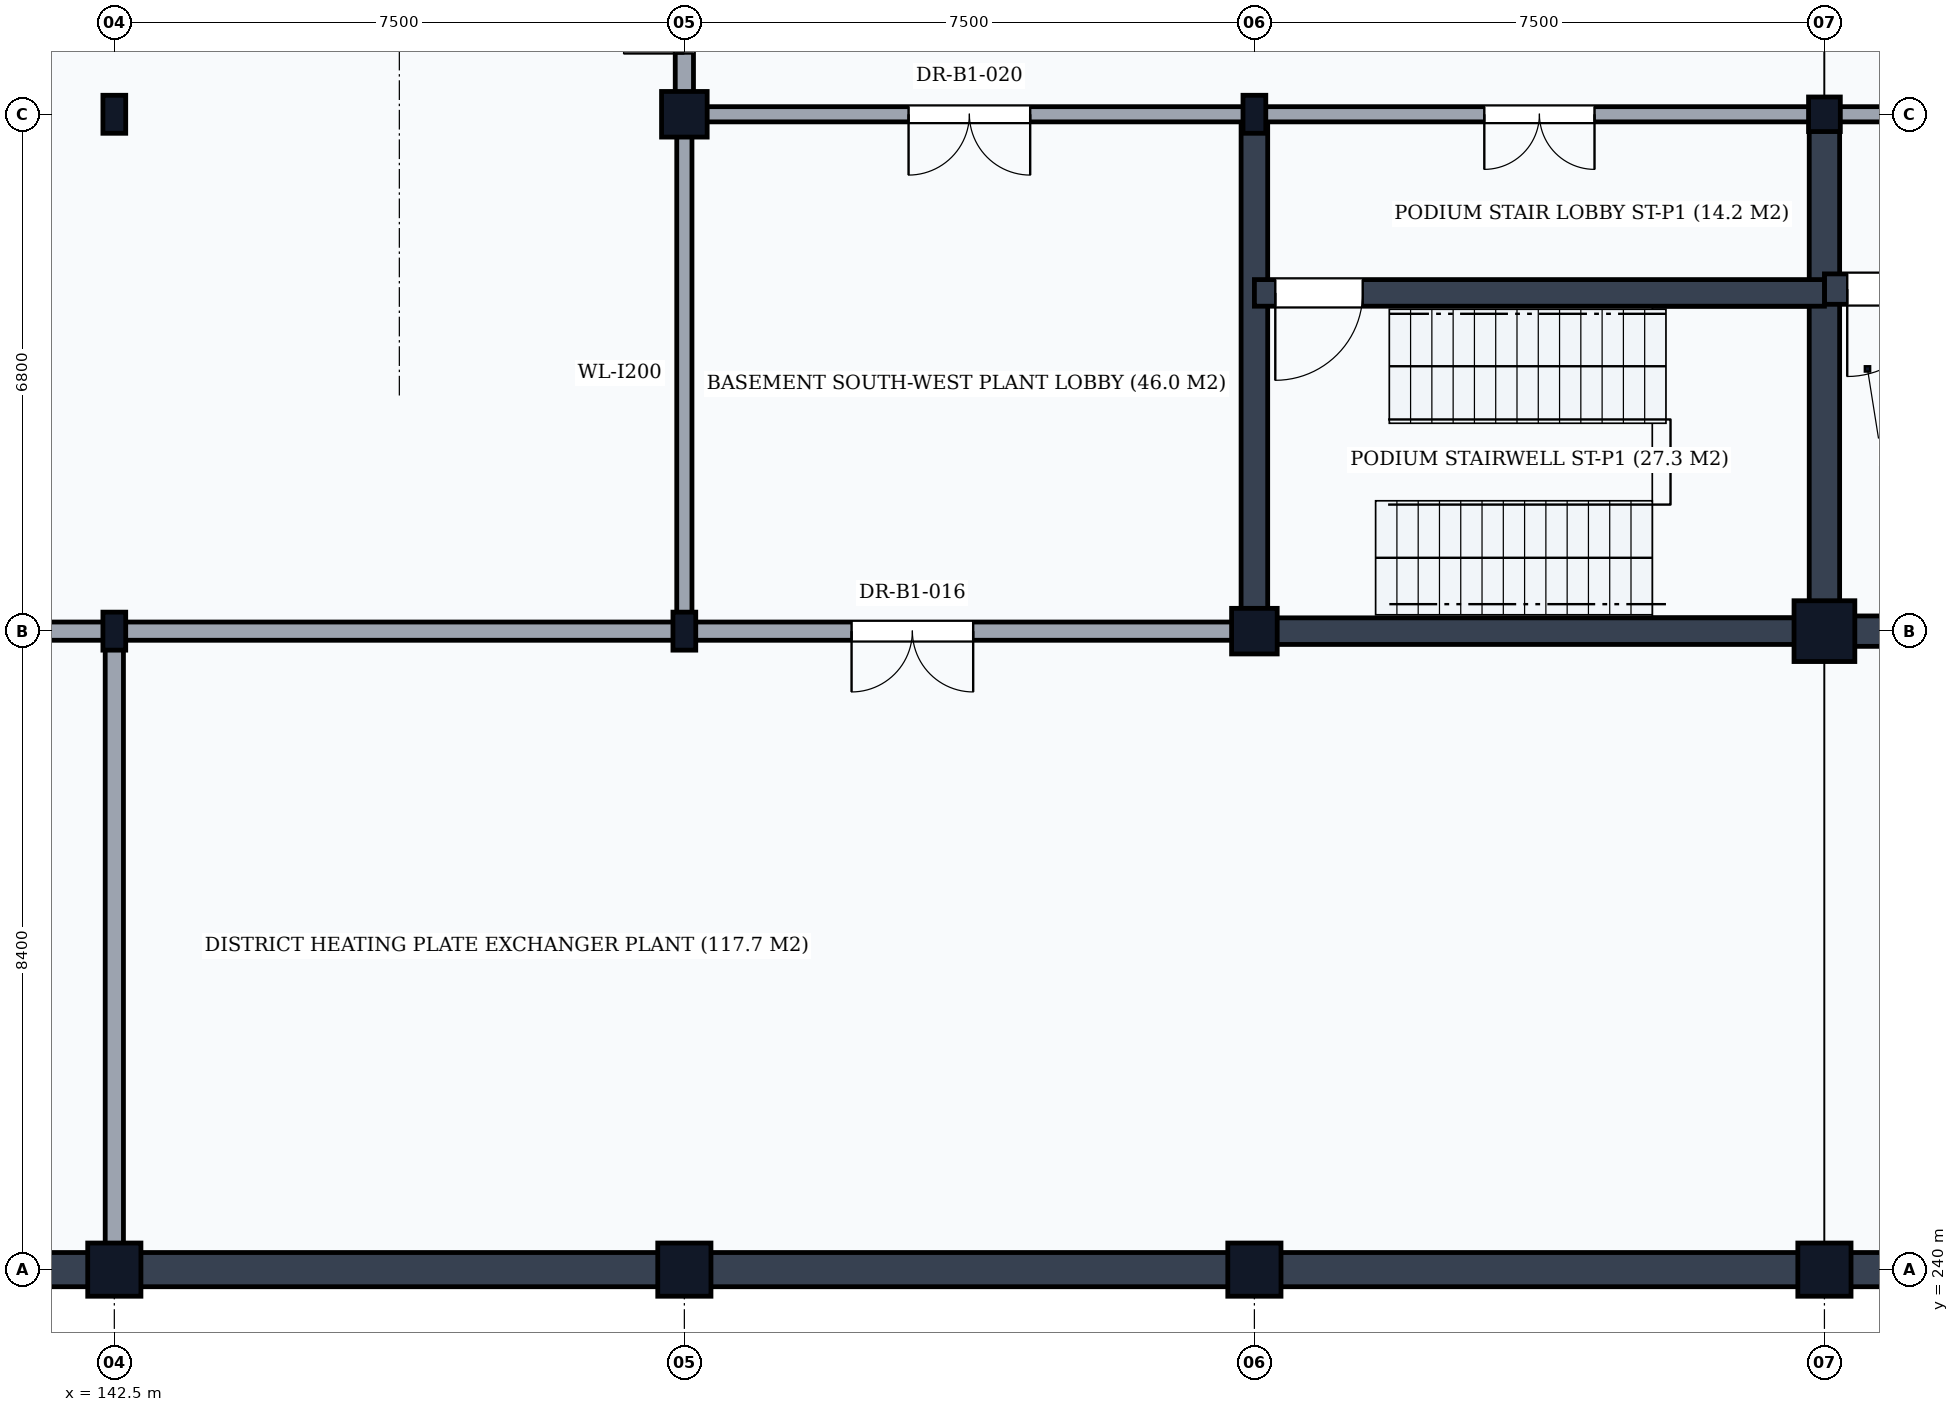
"""IFC4 building model, lengths in metres.
Left out: names, types, materials, properties, quantities, classifications, styles, units other than length and angle.
Written with IfcOpenShell. Run it as: python <this file> out.ifc"""

import sys

from ifc_helpers import new_model, si_unit, direction, frame, frame_2d, origin, origin_2d, place, context, subcontext, project, spatial, rectangle, i_section, extrude, element, fill, save


model = new_model("IFC4")
c1 = context("Model", 3, precision=1e-05, world=origin(), true_north=direction((0.0, 1.0)))
c2 = subcontext(c1, "Body", "Model", "MODEL_VIEW")
j1 = project(units=[si_unit("LENGTHUNIT", "METRE"), si_unit("PLANEANGLEUNIT", "RADIAN")], contexts=[c1])
p1 = place(None, origin())
s1 = spatial("IfcSite", under=j1, at=p1, CompositionType="ELEMENT")
p2 = place(p1, origin())
s2 = spatial("IfcBuilding", under=s1, at=p2, CompositionType="ELEMENT")
p3 = place(p2, frame((0.0, 0.0, -4.8)))
s3 = spatial("IfcBuildingStorey", under=s2, at=p3, CompositionType="ELEMENT", Elevation=-4.8)
p4 = place(p3, frame((142.5, 240.0, 0.0), z_axis=(0.0, 0.0, 1.0), x_axis=(1.0, 0.0, 0.0)))
e1 = element("IfcColumn", 1, at=p4, inside=s3, PredefinedType="COLUMN", context=c2, shape_type="SweptSolid", body=[
    extrude(rectangle(XDim=0.7, YDim=0.7, at=origin_2d()), origin(), (0.0, 0.0, 1.0), 4.8),
])
for number, where, z_axis, x_axis in (
    (2, (142.5, 248.4, 0.0), (0.0, 0.0, 1.0), (1.0, 0.0, 0.0)),
    (3, (142.5, 255.2, 0.0), (0.0, 0.0, 1.0), (1.0, 0.0, 0.0)),
):
    element("IfcColumn", number, at=place(p3, frame(where, z_axis=z_axis, x_axis=x_axis)), inside=s3, PredefinedType="COLUMN", context=c2, shape_type="SweptSolid", body=[
        extrude(i_section(OverallWidth=0.3, OverallDepth=0.5, WebThickness=0.014, FlangeThickness=0.028, FilletRadius=0.027, at=origin_2d()), origin(), (0.0, 0.0, 1.0), 4.8),
    ])
p5 = place(p3, frame((150.0, 240.0, 0.0), z_axis=(0.0, 0.0, 1.0), x_axis=(1.0, 0.0, 0.0)))
e4 = element("IfcColumn", 4, at=p5, inside=s3, PredefinedType="COLUMN", context=c2, shape_type="SweptSolid", body=[
    extrude(rectangle(XDim=0.7, YDim=0.7, at=origin_2d()), origin(), (0.0, 0.0, 1.0), 4.8),
])
p6 = place(p3, frame((150.0, 248.4, 0.0), z_axis=(0.0, 0.0, 1.0), x_axis=(1.0, 0.0, 0.0)))
e5 = element("IfcColumn", 5, at=p6, inside=s3, PredefinedType="COLUMN", context=c2, shape_type="SweptSolid", body=[
    extrude(i_section(OverallWidth=0.3, OverallDepth=0.5, WebThickness=0.014, FlangeThickness=0.028, FilletRadius=0.027, at=origin_2d()), origin(), (0.0, 0.0, 1.0), 4.8),
])
p7 = place(p3, frame((150.0, 255.2, 0.0), z_axis=(0.0, 0.0, 1.0), x_axis=(1.0, 0.0, 0.0)))
e6 = element("IfcColumn", 6, at=p7, inside=s3, PredefinedType="COLUMN", context=c2, shape_type="SweptSolid", body=[
    extrude(rectangle(XDim=0.6, YDim=0.6, at=origin_2d()), origin(), (0.0, 0.0, 1.0), 4.8),
])
p8 = place(p3, frame((157.5, 240.0, 0.0), z_axis=(0.0, 0.0, 1.0), x_axis=(1.0, 0.0, 0.0)))
e7 = element("IfcColumn", 7, at=p8, inside=s3, PredefinedType="COLUMN", context=c2, shape_type="SweptSolid", body=[
    extrude(rectangle(XDim=0.7, YDim=0.7, at=origin_2d()), origin(), (0.0, 0.0, 1.0), 4.8),
])
p9 = place(p3, frame((157.5, 248.4, 0.0), z_axis=(0.0, 0.0, 1.0), x_axis=(1.0, 0.0, 0.0)))
e8 = element("IfcColumn", 8, at=p9, inside=s3, PredefinedType="COLUMN", context=c2, shape_type="SweptSolid", body=[
    extrude(rectangle(XDim=0.6, YDim=0.6, at=origin_2d()), origin(), (0.0, 0.0, 1.0), 4.8),
])
p10 = place(p3, frame((157.5, 255.2, 0.0), z_axis=(0.0, 0.0, 1.0), x_axis=(1.0, 0.0, 0.0)))
e9 = element("IfcColumn", 9, at=p10, inside=s3, PredefinedType="COLUMN", context=c2, shape_type="SweptSolid", body=[
    extrude(i_section(OverallWidth=0.3, OverallDepth=0.5, WebThickness=0.014, FlangeThickness=0.028, FilletRadius=0.027, at=origin_2d()), origin(), (0.0, 0.0, 1.0), 4.8),
])
p11 = place(p3, frame((165.0, 240.0, 0.0), z_axis=(0.0, 0.0, 1.0), x_axis=(1.0, 0.0, 0.0)))
e10 = element("IfcColumn", 10, at=p11, inside=s3, PredefinedType="COLUMN", context=c2, shape_type="SweptSolid", body=[
    extrude(rectangle(XDim=0.7, YDim=0.7, at=origin_2d()), origin(), (0.0, 0.0, 1.0), 4.8),
])
p12 = place(p3, frame((165.0, 248.4, 0.0), z_axis=(0.0, 0.0, 1.0), x_axis=(1.0, 0.0, 0.0)))
e11 = element("IfcColumn", 11, at=p12, inside=s3, PredefinedType="COLUMN", context=c2, shape_type="SweptSolid", body=[
    extrude(rectangle(XDim=0.8, YDim=0.8, at=origin_2d()), origin(), (0.0, 0.0, 1.0), 4.8),
])
p13 = place(p3, frame((165.0, 255.2, 0.0), z_axis=(0.0, 0.0, 1.0), x_axis=(1.0, 0.0, 0.0)))
e12 = element("IfcColumn", 12, at=p13, inside=s3, PredefinedType="COLUMN", context=c2, shape_type="SweptSolid", body=[
    extrude(i_section(OverallWidth=0.418, OverallDepth=0.455, WebThickness=0.042, FlangeThickness=0.068, FilletRadius=0.015, at=origin_2d()), origin(), (0.0, 0.0, 1.0), 4.8),
])
for number, where, z_axis, x_axis in (
    (13, (135.0, 240.0, 0.0), (0.0, 0.0, 1.0), (1.0, 0.0, 0.0)),
    (14, (142.5, 240.0, 0.0), (0.0, 0.0, 1.0), (1.0, 0.0, 0.0)),
    (15, (150.0, 240.0, 0.0), (0.0, 0.0, 1.0), (1.0, 0.0, 0.0)),
    (16, (157.5, 240.0, 0.0), (0.0, 0.0, 1.0), (1.0, 0.0, 0.0)),
):
    element("IfcWall", number, at=place(p3, frame(where, z_axis=z_axis, x_axis=x_axis)), inside=s3, PredefinedType="SHEAR", context=c2, shape_type="SweptSolid", body=[
        extrude(rectangle(XDim=7.5, YDim=0.45, at=frame_2d((3.75, 0.0))), origin(), (0.0, 0.0, 1.0), 4.51),
    ])
p14 = place(p3, frame((165.0, 240.0, 0.0), z_axis=(0.0, 0.0, 1.0), x_axis=(1.0, 0.0, 0.0)))
e17 = element("IfcWall", 17, at=p14, inside=s3, PredefinedType="SHEAR", context=c2, shape_type="SweptSolid", body=[
    extrude(rectangle(XDim=8.0, YDim=0.45, at=frame_2d((4.0, 0.0))), origin(), (0.0, 0.0, 1.0), 4.51),
])
p15 = place(p3, frame((165.0, 248.4, 0.0), z_axis=(0.0, 0.0, 1.0), x_axis=(1.0, 0.0, 0.0)))
e18 = element("IfcWall", 18, at=p15, inside=s3, PredefinedType="SHEAR", context=c2, shape_type="SweptSolid", body=[
    extrude(rectangle(XDim=8.0, YDim=0.4, at=frame_2d((4.0, 0.0))), origin(), (0.0, 0.0, 1.0), 4.51),
])
p16 = place(p3, frame((165.0, 248.4, 0.0), z_axis=(0.0, 0.0, 1.0), x_axis=(0.0, 1.0, 0.0)))
e19 = element("IfcWall", 19, at=p16, inside=s3, PredefinedType="SHEAR", context=c2, shape_type="SweptSolid", body=[
    extrude(rectangle(XDim=6.8, YDim=0.4, at=frame_2d((3.4, 0.0))), origin(), (0.0, 0.0, 1.0), 4.51),
])
p17 = place(p3, frame((165.0, 252.9, 0.0), z_axis=(0.0, 0.0, 1.0), x_axis=(1.0, 0.0, 0.0)))
e20 = element("IfcWall", 20, at=p17, inside=s3, PredefinedType="SHEAR", context=c2, shape_type="SweptSolid", body=[
    extrude(rectangle(XDim=8.0, YDim=0.4, at=frame_2d((4.0, 0.0))), origin(), (0.0, 0.0, 1.0), 4.51),
])
p18 = place(p17, frame((0.3, 0.0, 0.0)))
e21 = element("IfcOpeningElement", 21, at=p18, cuts=e20, PredefinedType="OPENING", context=c2, shape_type="SweptSolid", body=[
    extrude(rectangle(XDim=1.15, YDim=2.15, at=frame_2d((0.575, 1.075))), frame((0.0, 0.215, 0.0), z_axis=(0.0, -1.0, 0.0), x_axis=(1.0, 0.0, 0.0)), (0.0, 0.0, 1.0), 0.43),
])
p19 = place(p3, frame((165.0, 255.2, 0.0), z_axis=(0.0, 0.0, 1.0), x_axis=(1.0, 0.0, 0.0)))
e22 = element("IfcWall", 22, at=p19, inside=s3, PredefinedType="PARTITIONING", context=c2, shape_type="SweptSolid", body=[
    extrude(rectangle(XDim=8.0, YDim=0.2, at=frame_2d((4.0, 0.0))), origin(), (0.0, 0.0, 1.0), 3.858),
])
p20 = place(p19, frame((3.275, 0.0, 0.0)))
e23 = element("IfcOpeningElement", 23, at=p20, cuts=e22, PredefinedType="OPENING", context=c2, shape_type="SweptSolid", body=[
    extrude(rectangle(XDim=1.45, YDim=2.2, at=frame_2d((0.725, 1.1))), frame((0.0, 0.115, 0.0), z_axis=(0.0, -1.0, 0.0), x_axis=(1.0, 0.0, 0.0)), (0.0, 0.0, 1.0), 0.23),
])
p21 = place(p3, frame((157.5, 248.4, 0.0), z_axis=(0.0, 0.0, 1.0), x_axis=(1.0, 0.0, 0.0)))
e24 = element("IfcWall", 24, at=p21, inside=s3, PredefinedType="SHEAR", context=c2, shape_type="SweptSolid", body=[
    extrude(rectangle(XDim=7.5, YDim=0.35, at=frame_2d((3.75, 0.0))), origin(), (0.0, 0.0, 1.0), 4.51),
])
p22 = place(p3, frame((157.5, 248.4, 0.0), z_axis=(0.0, 0.0, 1.0), x_axis=(0.0, 1.0, 0.0)))
e25 = element("IfcWall", 25, at=p22, inside=s3, PredefinedType="SHEAR", context=c2, shape_type="SweptSolid", body=[
    extrude(rectangle(XDim=6.8, YDim=0.35, at=frame_2d((3.4, 0.0))), origin(), (0.0, 0.0, 1.0), 4.51),
])
p23 = place(p3, frame((157.5, 252.85, 0.0), z_axis=(0.0, 0.0, 1.0), x_axis=(1.0, 0.0, 0.0)))
e26 = element("IfcWall", 26, at=p23, inside=s3, PredefinedType="SHEAR", context=c2, shape_type="SweptSolid", body=[
    extrude(rectangle(XDim=7.5, YDim=0.35, at=frame_2d((3.75, 0.0))), origin(), (0.0, 0.0, 1.0), 4.51),
])
p24 = place(p23, frame((0.275, 0.0, 0.0)))
e27 = element("IfcOpeningElement", 27, at=p24, cuts=e26, PredefinedType="OPENING", context=c2, shape_type="SweptSolid", body=[
    extrude(rectangle(XDim=1.15, YDim=2.15, at=frame_2d((0.575, 1.075))), frame((0.0, 0.19, 0.0), z_axis=(0.0, -1.0, 0.0), x_axis=(1.0, 0.0, 0.0)), (0.0, 0.0, 1.0), 0.38),
])
p25 = place(p3, frame((157.5, 255.2, 0.0), z_axis=(0.0, 0.0, 1.0), x_axis=(1.0, 0.0, 0.0)))
e28 = element("IfcWall", 28, at=p25, inside=s3, PredefinedType="PARTITIONING", context=c2, shape_type="SweptSolid", body=[
    extrude(rectangle(XDim=7.5, YDim=0.2, at=frame_2d((3.75, 0.0))), origin(), (0.0, 0.0, 1.0), 3.908),
])
p26 = place(p25, frame((3.025, 0.0, 0.0)))
e29 = element("IfcOpeningElement", 29, at=p26, cuts=e28, PredefinedType="OPENING", context=c2, shape_type="SweptSolid", body=[
    extrude(rectangle(XDim=1.45, YDim=2.2, at=frame_2d((0.725, 1.1))), frame((0.0, 0.115, 0.0), z_axis=(0.0, -1.0, 0.0), x_axis=(1.0, 0.0, 0.0)), (0.0, 0.0, 1.0), 0.23),
])
p27 = place(p3, frame((150.0, 248.4, 0.0), z_axis=(0.0, 0.0, 1.0), x_axis=(0.0, 1.0, 0.0)))
e30 = element("IfcWall", 30, at=p27, inside=s3, PredefinedType="PARTITIONING", context=c2, shape_type="SweptSolid", body=[
    extrude(rectangle(XDim=6.8, YDim=0.2, at=frame_2d((3.4, 0.0))), origin(), (0.0, 0.0, 1.0), 3.808),
])
p28 = place(p3, frame((120.0, 248.4, 0.0), z_axis=(0.0, 0.0, 1.0), x_axis=(1.0, 0.0, 0.0)))
e31 = element("IfcWall", 31, at=p28, inside=s3, PredefinedType="PARTITIONING", context=c2, shape_type="SweptSolid", body=[
    extrude(rectangle(XDim=37.5, YDim=0.24, at=frame_2d((18.75, 0.0))), origin(), (0.0, 0.0, 1.0), 3.908),
])
p29 = place(p28, frame((17.2, 0.0, 0.0)))
e32 = element("IfcOpeningElement", 32, at=p29, cuts=e31, PredefinedType="OPENING", context=c2, shape_type="SweptSolid", body=[
    extrude(rectangle(XDim=1.6, YDim=2.1, at=frame_2d((0.8, 1.05))), frame((0.0, 0.135, 0.0), z_axis=(0.0, -1.0, 0.0), x_axis=(1.0, 0.0, 0.0)), (0.0, 0.0, 1.0), 0.27),
])
p30 = place(p28, frame((32.2, 0.0, 0.0)))
e33 = element("IfcOpeningElement", 33, at=p30, cuts=e31, PredefinedType="OPENING", context=c2, shape_type="SweptSolid", body=[
    extrude(rectangle(XDim=1.6, YDim=2.1, at=frame_2d((0.8, 1.05))), frame((0.0, 0.135, 0.0), z_axis=(0.0, -1.0, 0.0), x_axis=(1.0, 0.0, 0.0)), (0.0, 0.0, 1.0), 0.27),
])
p31 = place(p3, frame((142.5, 240.0, 0.0), z_axis=(0.0, 0.0, 1.0), x_axis=(0.0, 1.0, 0.0)))
e34 = element("IfcWall", 34, at=p31, inside=s3, PredefinedType="PARTITIONING", context=c2, shape_type="SweptSolid", body=[
    extrude(rectangle(XDim=8.4, YDim=0.24, at=frame_2d((4.2, 0.0))), origin(), (0.0, 0.0, 1.0), 3.858),
])
p32 = place(p3, frame((150.0, 255.2, 0.0), z_axis=(0.0, 0.0, 1.0), x_axis=(1.0, 0.0, 0.0)))
e35 = element("IfcWall", 35, at=p32, inside=s3, PredefinedType="PARTITIONING", context=c2, shape_type="SweptSolid", body=[
    extrude(rectangle(XDim=7.5, YDim=0.2, at=frame_2d((3.75, 0.0))), origin(), (0.0, 0.0, 1.0), 3.908),
])
p33 = place(p32, frame((2.95, 0.0, 0.0)))
e36 = element("IfcOpeningElement", 36, at=p33, cuts=e35, PredefinedType="OPENING", context=c2, shape_type="SweptSolid", body=[
    extrude(rectangle(XDim=1.6, YDim=2.1, at=frame_2d((0.8, 1.05))), frame((0.0, 0.115, 0.0), z_axis=(0.0, -1.0, 0.0), x_axis=(1.0, 0.0, 0.0)), (0.0, 0.0, 1.0), 0.23),
])
p34 = place(p3, frame((150.0, 255.2, 0.0), z_axis=(0.0, 0.0, 1.0), x_axis=(0.0, 1.0, 0.0)))
e37 = element("IfcWall", 37, at=p34, inside=s3, PredefinedType="PARTITIONING", context=c2, shape_type="SweptSolid", body=[
    extrude(rectangle(XDim=98.8, YDim=0.24, at=frame_2d((49.4, 0.0))), origin(), (0.0, 0.0, 1.0), 3.808),
])
p35 = place(p34, frame((0.8, 0.0, 0.0)))
e38 = element("IfcOpeningElement", 38, at=p35, cuts=e37, PredefinedType="OPENING", context=c2, shape_type="SweptSolid", body=[
    extrude(rectangle(XDim=1.6, YDim=2.1, at=frame_2d((0.8, 1.05))), frame((0.0, 0.135, 0.0), z_axis=(0.0, -1.0, 0.0), x_axis=(1.0, 0.0, 0.0)), (0.0, 0.0, 1.0), 0.27),
])
p36 = place(p34, frame((47.4, 0.0, 0.0)))
e39 = element("IfcOpeningElement", 39, at=p36, cuts=e37, PredefinedType="OPENING", context=c2, shape_type="SweptSolid", body=[
    extrude(rectangle(XDim=1.6, YDim=2.1, at=frame_2d((0.8, 1.05))), frame((0.0, 0.135, 0.0), z_axis=(0.0, -1.0, 0.0), x_axis=(1.0, 0.0, 0.0)), (0.0, 0.0, 1.0), 0.27),
])
p37 = place(p18, frame((1.15, 0.0, 0.0), z_axis=(0.0, 0.0, 1.0), x_axis=(-1.0, 0.0, 0.0)))
e40 = element("IfcDoor", 40, at=p37, inside=s3, OperationType="SINGLE_SWING_RIGHT", PredefinedType="DOOR", context=c2, shape_type="SweptSolid", body=[
    extrude(rectangle(XDim=1.15, YDim=2.15, at=frame_2d((0.575, 1.075))), frame((0.0, 0.025, 0.0), z_axis=(0.0, -1.0, 0.0), x_axis=(1.0, 0.0, 0.0)), (0.0, 0.0, 1.0), 0.05),
])
fill(e21, e40)
p38 = place(p24, frame((1.15, 0.0, 0.0), z_axis=(0.0, 0.0, 1.0), x_axis=(-1.0, 0.0, 0.0)))
e41 = element("IfcDoor", 41, at=p38, inside=s3, OperationType="SINGLE_SWING_RIGHT", PredefinedType="DOOR", context=c2, shape_type="SweptSolid", body=[
    extrude(rectangle(XDim=1.15, YDim=2.15, at=frame_2d((0.575, 1.075))), frame((0.0, 0.025, 0.0), z_axis=(0.0, -1.0, 0.0), x_axis=(1.0, 0.0, 0.0)), (0.0, 0.0, 1.0), 0.05),
])
fill(e27, e41)
p39 = place(p26, frame((1.45, 0.0, 0.0), z_axis=(0.0, 0.0, 1.0), x_axis=(-1.0, 0.0, 0.0)))
e42 = element("IfcDoor", 42, at=p39, inside=s3, OperationType="DOUBLE_DOOR_SINGLE_SWING", PredefinedType="DOOR", context=c2, shape_type="SweptSolid", body=[
    extrude(rectangle(XDim=1.45, YDim=2.2, at=frame_2d((0.725, 1.1))), frame((0.0, 0.025, 0.0), z_axis=(0.0, -1.0, 0.0), x_axis=(1.0, 0.0, 0.0)), (0.0, 0.0, 1.0), 0.05),
])
fill(e29, e42)
p40 = place(p30, frame((1.6, 0.0, 0.0), z_axis=(0.0, 0.0, 1.0), x_axis=(-1.0, 0.0, 0.0)))
e43 = element("IfcDoor", 43, at=p40, inside=s3, OperationType="DOUBLE_DOOR_SINGLE_SWING", PredefinedType="DOOR", context=c2, shape_type="SweptSolid", body=[
    extrude(rectangle(XDim=1.6, YDim=2.1, at=frame_2d((0.8, 1.05))), frame((0.0, 0.025, 0.0), z_axis=(0.0, -1.0, 0.0), x_axis=(1.0, 0.0, 0.0)), (0.0, 0.0, 1.0), 0.05),
])
fill(e33, e43)
p41 = place(p33, frame((1.6, 0.0, 0.0), z_axis=(0.0, 0.0, 1.0), x_axis=(-1.0, 0.0, 0.0)))
e44 = element("IfcDoor", 44, at=p41, inside=s3, OperationType="DOUBLE_DOOR_SINGLE_SWING", PredefinedType="DOOR", context=c2, shape_type="SweptSolid", body=[
    extrude(rectangle(XDim=1.6, YDim=2.1, at=frame_2d((0.8, 1.05))), frame((0.0, 0.025, 0.0), z_axis=(0.0, -1.0, 0.0), x_axis=(1.0, 0.0, 0.0)), (0.0, 0.0, 1.0), 0.05),
])
fill(e36, e44)
p42 = place(p35, origin())
e45 = element("IfcDoor", 45, at=p42, inside=s3, OperationType="DOUBLE_DOOR_SINGLE_SWING", PredefinedType="DOOR", context=c2, shape_type="SweptSolid", body=[
    extrude(rectangle(XDim=1.6, YDim=2.1, at=frame_2d((0.8, 1.05))), frame((0.0, 0.025, 0.0), z_axis=(0.0, -1.0, 0.0), x_axis=(1.0, 0.0, 0.0)), (0.0, 0.0, 1.0), 0.05),
])
fill(e38, e45)
save(model, sys.argv[1])
